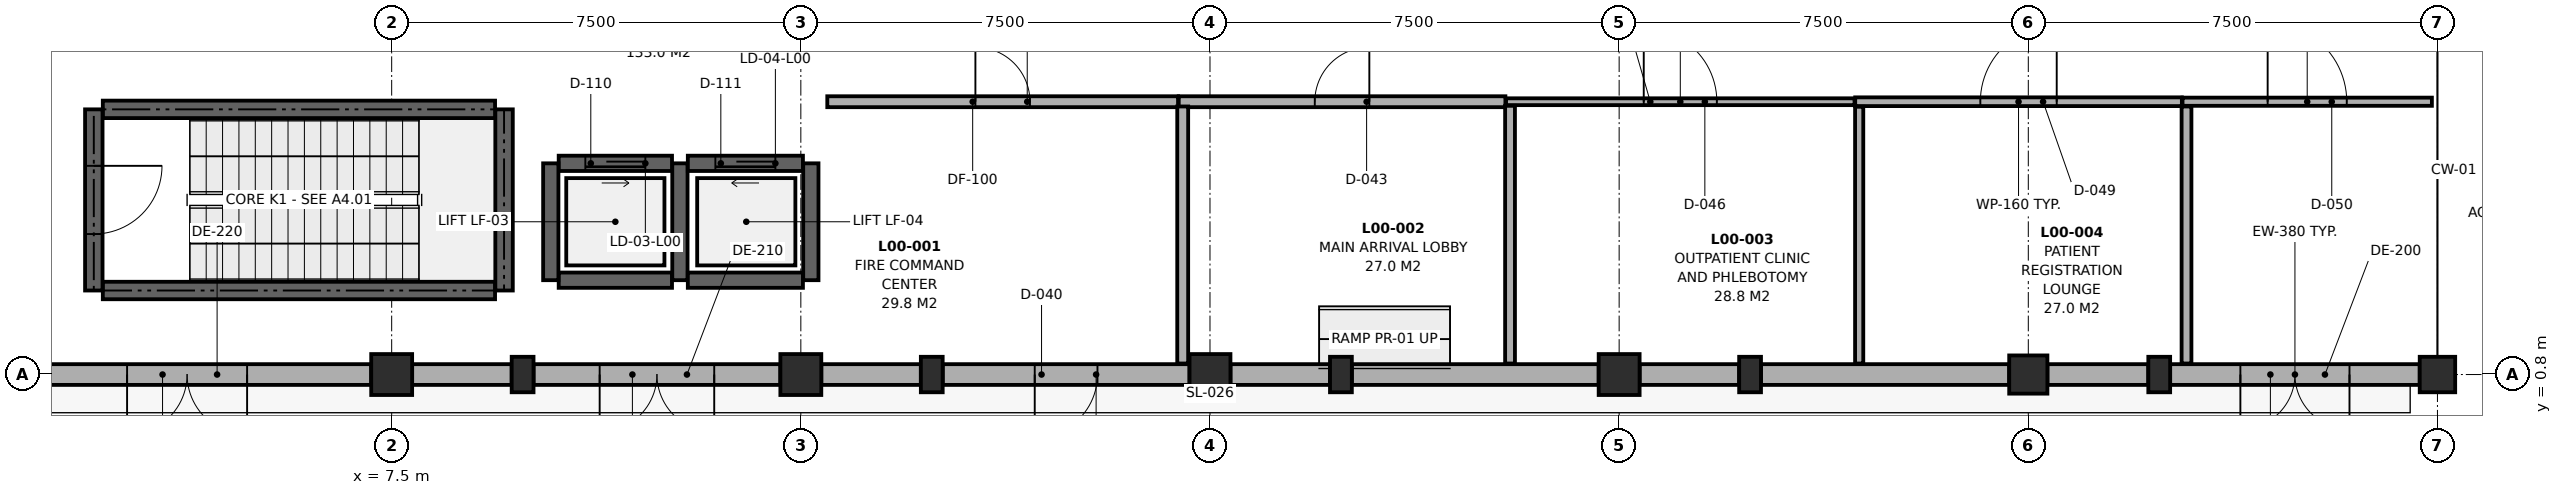
"""IFC4 building model, lengths in metres.
Left out: names, types, materials, properties, quantities, classifications, styles, units other than length and angle.
Written with IfcOpenShell. Run it as: python <this file> out.ifc"""

import sys

from ifc_helpers import new_model, si_unit, direction, frame, frame_2d, origin, origin_2d, place, context, subcontext, project, spatial, rectangle, extrude, element, fill, save


model = new_model("IFC4")
c1 = context("Model", 3, precision=1e-05, world=origin(), true_north=direction((0.0, 1.0)))
c2 = subcontext(c1, "Body", "Model", "MODEL_VIEW")
j1 = project(units=[si_unit("LENGTHUNIT", "METRE"), si_unit("PLANEANGLEUNIT", "RADIAN")], contexts=[c1])
p1 = place(None, origin())
s1 = spatial("IfcSite", under=j1, at=p1, CompositionType="ELEMENT")
p2 = place(p1, origin())
s2 = spatial("IfcBuilding", under=s1, at=p2, CompositionType="ELEMENT")
p3 = place(p2, origin())
s3 = spatial("IfcBuildingStorey", under=s2, at=p3, CompositionType="ELEMENT", Elevation=0.0)
for number, where, z_axis, x_axis in (
    (1, (7.5, 0.8, 0.0), (0.0, 0.0, 1.0), (1.0, 0.0, 0.0)),
    (2, (15.0, 0.8, 0.0), (0.0, 0.0, 1.0), (1.0, 0.0, 0.0)),
    (3, (22.5, 0.8, 0.0), (0.0, 0.0, 1.0), (1.0, 0.0, 0.0)),
    (4, (30.0, 0.8, 0.0), (0.0, 0.0, 1.0), (1.0, 0.0, 0.0)),
):
    element("IfcColumn", number, at=place(p3, frame(where, z_axis=z_axis, x_axis=x_axis)), inside=s3, PredefinedType="COLUMN", context=c2, shape_type="SweptSolid", body=[
        extrude(rectangle(XDim=0.75, YDim=0.75, at=origin_2d()), origin(), (0.0, 0.0, 1.0), 4.7),
    ])
p4 = place(p3, frame((37.5, 0.8, 0.0), z_axis=(0.0, 0.0, 1.0), x_axis=(1.0, 0.0, 0.0)))
e5 = element("IfcColumn", 5, at=p4, inside=s3, PredefinedType="COLUMN", context=c2, shape_type="SweptSolid", body=[
    extrude(rectangle(XDim=0.7, YDim=0.7, at=origin_2d()), origin(), (0.0, 0.0, 1.0), 4.7),
])
p5 = place(p3, frame((45.0, 0.8, 0.0), z_axis=(0.0, 0.0, 1.0), x_axis=(1.0, 0.0, 0.0)))
e6 = element("IfcColumn", 6, at=p5, inside=s3, PredefinedType="COLUMN", context=c2, shape_type="SweptSolid", body=[
    extrude(rectangle(XDim=0.65, YDim=0.65, at=origin_2d()), origin(), (0.0, 0.0, 1.0), 4.7),
])
for number, where, z_axis, x_axis in (
    (7, (9.9, 0.8, 0.0), (0.0, 0.0, 1.0), (1.0, 0.0, 0.0)),
    (8, (17.4, 0.8, 0.0), (0.0, 0.0, 1.0), (1.0, 0.0, 0.0)),
    (9, (24.9, 0.8, 0.0), (0.0, 0.0, 1.0), (1.0, 0.0, 0.0)),
    (10, (32.4, 0.8, 0.0), (0.0, 0.0, 1.0), (1.0, 0.0, 0.0)),
    (11, (39.9, 0.8, 0.0), (0.0, 0.0, 1.0), (1.0, 0.0, 0.0)),
):
    element("IfcColumn", number, at=place(p3, frame(where, z_axis=z_axis, x_axis=x_axis)), inside=s3, PredefinedType="PILASTER", context=c2, shape_type="SweptSolid", body=[
        extrude(rectangle(XDim=0.4, YDim=0.65, at=origin_2d()), origin(), (0.0, 0.0, 1.0), 4.7),
    ])
p6 = place(p3, frame((44.675, 0.8, 0.0), z_axis=(0.0, 0.0, 1.0), x_axis=(-1.0, 0.0, 0.0)))
e12 = element("IfcWall", 12, at=p6, inside=s3, PredefinedType="SOLIDWALL", context=c2, shape_type="SweptSolid", body=[
    extrude(rectangle(XDim=4.575, YDim=0.38, at=frame_2d((2.288, 0.0))), origin(), (0.0, 0.0, 1.0), 4.035),
])
p7 = place(p6, frame((1.288, 0.0, 0.0)))
e13 = element("IfcOpeningElement", 13, at=p7, cuts=e12, PredefinedType="OPENING", context=c2, shape_type="SweptSolid", body=[
    extrude(rectangle(XDim=2.0, YDim=2.35, at=frame_2d((1.0, 1.175))), frame((0.0, 0.202, 0.0), z_axis=(0.0, -1.0, 0.0), x_axis=(1.0, 0.0, 0.0)), (0.0, 0.0, 1.0), 0.404),
])
p8 = place(p3, frame((39.7, 0.8, 0.0), z_axis=(0.0, 0.0, 1.0), x_axis=(-1.0, 0.0, 0.0)))
e14 = element("IfcWall", 14, at=p8, inside=s3, PredefinedType="SOLIDWALL", context=c2, shape_type="SweptSolid", body=[
    extrude(rectangle(XDim=1.85, YDim=0.38, at=frame_2d((0.925, 0.0))), origin(), (0.0, 0.0, 1.0), 4.035),
])
p9 = place(p3, frame((37.15, 0.8, 0.0), z_axis=(0.0, 0.0, 1.0), x_axis=(-1.0, 0.0, 0.0)))
e15 = element("IfcWall", 15, at=p9, inside=s3, PredefinedType="SOLIDWALL", context=c2, shape_type="SweptSolid", body=[
    extrude(rectangle(XDim=4.55, YDim=0.38, at=frame_2d((2.275, 0.0))), origin(), (0.0, 0.0, 1.0), 4.035),
])
p10 = place(p3, frame((32.2, 0.8, 0.0), z_axis=(0.0, 0.0, 1.0), x_axis=(-1.0, 0.0, 0.0)))
e16 = element("IfcWall", 16, at=p10, inside=s3, PredefinedType="SOLIDWALL", context=c2, shape_type="SweptSolid", body=[
    extrude(rectangle(XDim=1.825, YDim=0.38, at=frame_2d((0.913, 0.0))), origin(), (0.0, 0.0, 1.0), 4.035),
])
p11 = place(p3, frame((29.625, 0.8, 0.0), z_axis=(0.0, 0.0, 1.0), x_axis=(-1.0, 0.0, 0.0)))
e17 = element("IfcWall", 17, at=p11, inside=s3, PredefinedType="SOLIDWALL", context=c2, shape_type="SweptSolid", body=[
    extrude(rectangle(XDim=4.525, YDim=0.38, at=frame_2d((2.262, 0.0))), origin(), (0.0, 0.0, 1.0), 4.035),
])
p12 = place(p3, frame((24.7, 0.8, 0.0), z_axis=(0.0, 0.0, 1.0), x_axis=(-1.0, 0.0, 0.0)))
e18 = element("IfcWall", 18, at=p12, inside=s3, PredefinedType="SOLIDWALL", context=c2, shape_type="SweptSolid", body=[
    extrude(rectangle(XDim=1.825, YDim=0.38, at=frame_2d((0.913, 0.0))), origin(), (0.0, 0.0, 1.0), 4.035),
])
p13 = place(p3, frame((22.125, 0.8, 0.0), z_axis=(0.0, 0.0, 1.0), x_axis=(-1.0, 0.0, 0.0)))
e19 = element("IfcWall", 19, at=p13, inside=s3, PredefinedType="SOLIDWALL", context=c2, shape_type="SweptSolid", body=[
    extrude(rectangle(XDim=4.525, YDim=0.38, at=frame_2d((2.262, 0.0))), origin(), (0.0, 0.0, 1.0), 4.035),
])
p14 = place(p13, frame((1.688, 0.0, 0.0)))
e20 = element("IfcOpeningElement", 20, at=p14, cuts=e19, PredefinedType="OPENING", context=c2, shape_type="SweptSolid", body=[
    extrude(rectangle(XDim=1.15, YDim=2.2, at=frame_2d((0.575, 1.1))), frame((0.0, 0.202, 0.0), z_axis=(0.0, -1.0, 0.0), x_axis=(1.0, 0.0, 0.0)), (0.0, 0.0, 1.0), 0.404),
])
p15 = place(p3, frame((17.2, 0.8, 0.0), z_axis=(0.0, 0.0, 1.0), x_axis=(-1.0, 0.0, 0.0)))
e21 = element("IfcWall", 21, at=p15, inside=s3, PredefinedType="SOLIDWALL", context=c2, shape_type="SweptSolid", body=[
    extrude(rectangle(XDim=1.825, YDim=0.38, at=frame_2d((0.913, 0.0))), origin(), (0.0, 0.0, 1.0), 4.035),
])
p16 = place(p3, frame((14.625, 0.8, 0.0), z_axis=(0.0, 0.0, 1.0), x_axis=(-1.0, 0.0, 0.0)))
e22 = element("IfcWall", 22, at=p16, inside=s3, PredefinedType="SOLIDWALL", context=c2, shape_type="SweptSolid", body=[
    extrude(rectangle(XDim=4.525, YDim=0.38, at=frame_2d((2.262, 0.0))), origin(), (0.0, 0.0, 1.0), 4.035),
])
p17 = place(p16, frame((1.212, 0.0, 0.0)))
e23 = element("IfcOpeningElement", 23, at=p17, cuts=e22, PredefinedType="OPENING", context=c2, shape_type="SweptSolid", body=[
    extrude(rectangle(XDim=2.1, YDim=2.4, at=frame_2d((1.05, 1.2))), frame((0.0, 0.202, 0.0), z_axis=(0.0, -1.0, 0.0), x_axis=(1.0, 0.0, 0.0)), (0.0, 0.0, 1.0), 0.404),
])
p18 = place(p3, frame((9.7, 0.8, 0.0), z_axis=(0.0, 0.0, 1.0), x_axis=(-1.0, 0.0, 0.0)))
e24 = element("IfcWall", 24, at=p18, inside=s3, PredefinedType="SOLIDWALL", context=c2, shape_type="SweptSolid", body=[
    extrude(rectangle(XDim=1.825, YDim=0.38, at=frame_2d((0.913, 0.0))), origin(), (0.0, 0.0, 1.0), 4.035),
])
p19 = place(p3, frame((7.125, 0.8, 0.0), z_axis=(0.0, 0.0, 1.0), x_axis=(-1.0, 0.0, 0.0)))
e25 = element("IfcWall", 25, at=p19, inside=s3, PredefinedType="SOLIDWALL", context=c2, shape_type="SweptSolid", body=[
    extrude(rectangle(XDim=6.75, YDim=0.38, at=frame_2d((3.375, 0.0))), origin(), (0.0, 0.0, 1.0), 4.035),
])
p20 = place(p19, frame((2.275, 0.0, 0.0)))
e26 = element("IfcOpeningElement", 26, at=p20, cuts=e25, PredefinedType="OPENING", context=c2, shape_type="SweptSolid", body=[
    extrude(rectangle(XDim=2.2, YDim=2.45, at=frame_2d((1.1, 1.225))), frame((0.0, 0.202, 0.0), z_axis=(0.0, -1.0, 0.0), x_axis=(1.0, 0.0, 0.0)), (0.0, 0.0, 1.0), 0.404),
])
p21 = place(p3, frame((2.205, 2.34, 0.0), z_axis=(0.0, 0.0, 1.0), x_axis=(1.0, 0.0, 0.0)))
e27 = element("IfcWall", 27, at=p21, inside=s3, PredefinedType="SHEAR", context=c2, shape_type="SweptSolid", body=[
    extrude(rectangle(XDim=7.19, YDim=0.32, at=frame_2d((3.595, 0.0))), origin(), (0.0, 0.0, 1.0), 4.7),
])
p22 = place(p3, frame((9.56, 2.34, 0.0), z_axis=(0.0, 0.0, 1.0), x_axis=(0.0, 1.0, 0.0)))
e28 = element("IfcWall", 28, at=p22, inside=s3, PredefinedType="SHEAR", context=c2, shape_type="SweptSolid", body=[
    extrude(rectangle(XDim=3.32, YDim=0.32, at=frame_2d((1.66, 0.0))), origin(), (0.0, 0.0, 1.0), 4.7),
])
p23 = place(p3, frame((9.395, 5.66, 0.0), z_axis=(0.0, 0.0, 1.0), x_axis=(-1.0, 0.0, 0.0)))
e29 = element("IfcWall", 29, at=p23, inside=s3, PredefinedType="SHEAR", context=c2, shape_type="SweptSolid", body=[
    extrude(rectangle(XDim=7.19, YDim=0.32, at=frame_2d((3.595, 0.0))), origin(), (0.0, 0.0, 1.0), 4.7),
])
p24 = place(p3, frame((2.04, 5.66, 0.0), z_axis=(0.0, 0.0, 1.0), x_axis=(0.0, -1.0, 0.0)))
e30 = element("IfcWall", 30, at=p24, inside=s3, PredefinedType="SHEAR", context=c2, shape_type="SweptSolid", body=[
    extrude(rectangle(XDim=3.32, YDim=0.32, at=frame_2d((1.66, 0.0))), origin(), (0.0, 0.0, 1.0), 4.7),
])
p25 = place(p24, frame((1.035, 0.0, 0.0)))
e31 = element("IfcOpeningElement", 31, at=p25, cuts=e30, PredefinedType="OPENING", context=c2, shape_type="SweptSolid", body=[
    extrude(rectangle(XDim=1.25, YDim=2.2, at=frame_2d((0.625, 1.1))), frame((0.0, 0.172, 0.0), z_axis=(0.0, -1.0, 0.0), x_axis=(1.0, 0.0, 0.0)), (0.0, 0.0, 1.0), 0.344),
])
p26 = place(p3, frame((10.562, 2.529, 0.0), z_axis=(0.0, 0.0, 1.0), x_axis=(1.0, 0.0, 0.0)))
e32 = element("IfcWall", 32, at=p26, inside=s3, PredefinedType="SHEAR", context=c2, shape_type="SweptSolid", body=[
    extrude(rectangle(XDim=2.077, YDim=0.28, at=frame_2d((1.039, 0.0))), origin(), (0.0, 0.0, 1.0), 4.7),
])
p27 = place(p3, frame((12.783, 2.529, 0.0), z_axis=(0.0, 0.0, 1.0), x_axis=(0.0, 1.0, 0.0)))
e33 = element("IfcWall", 33, at=p27, inside=s3, PredefinedType="SHEAR", context=c2, shape_type="SweptSolid", body=[
    extrude(rectangle(XDim=2.141, YDim=0.28, at=frame_2d((1.071, 0.0))), origin(), (0.0, 0.0, 1.0), 4.7),
])
p28 = place(p3, frame((12.638, 4.671, 0.0), z_axis=(0.0, 0.0, 1.0), x_axis=(-1.0, 0.0, 0.0)))
e34 = element("IfcWall", 34, at=p28, inside=s3, PredefinedType="SHEAR", context=c2, shape_type="SweptSolid", body=[
    extrude(rectangle(XDim=2.077, YDim=0.28, at=frame_2d((1.039, 0.0))), origin(), (0.0, 0.0, 1.0), 4.7),
])
p29 = place(p28, frame((0.489, 0.0, 0.0)))
e35 = element("IfcOpeningElement", 35, at=p29, cuts=e34, PredefinedType="OPENING", context=c2, shape_type="SweptSolid", body=[
    extrude(rectangle(XDim=1.1, YDim=2.15, at=frame_2d((0.55, 1.075))), frame((0.0, 0.152, 0.0), z_axis=(0.0, -1.0, 0.0), x_axis=(1.0, 0.0, 0.0)), (0.0, 0.0, 1.0), 0.304),
])
p30 = place(p3, frame((10.417, 4.671, 0.0), z_axis=(0.0, 0.0, 1.0), x_axis=(0.0, -1.0, 0.0)))
e36 = element("IfcWall", 36, at=p30, inside=s3, PredefinedType="SHEAR", context=c2, shape_type="SweptSolid", body=[
    extrude(rectangle(XDim=2.141, YDim=0.28, at=frame_2d((1.071, 0.0))), origin(), (0.0, 0.0, 1.0), 4.7),
])
p31 = place(p3, frame((12.928, 2.529, 0.0), z_axis=(0.0, 0.0, 1.0), x_axis=(1.0, 0.0, 0.0)))
e37 = element("IfcWall", 37, at=p31, inside=s3, PredefinedType="SHEAR", context=c2, shape_type="SweptSolid", body=[
    extrude(rectangle(XDim=2.11, YDim=0.28, at=frame_2d((1.055, 0.0))), origin(), (0.0, 0.0, 1.0), 4.7),
])
p32 = place(p3, frame((15.184, 2.529, 0.0), z_axis=(0.0, 0.0, 1.0), x_axis=(0.0, 1.0, 0.0)))
e38 = element("IfcWall", 38, at=p32, inside=s3, PredefinedType="SHEAR", context=c2, shape_type="SweptSolid", body=[
    extrude(rectangle(XDim=2.141, YDim=0.28, at=frame_2d((1.071, 0.0))), origin(), (0.0, 0.0, 1.0), 4.7),
])
p33 = place(p3, frame((15.039, 4.671, 0.0), z_axis=(0.0, 0.0, 1.0), x_axis=(-1.0, 0.0, 0.0)))
e39 = element("IfcWall", 39, at=p33, inside=s3, PredefinedType="SHEAR", context=c2, shape_type="SweptSolid", body=[
    extrude(rectangle(XDim=2.11, YDim=0.28, at=frame_2d((1.055, 0.0))), origin(), (0.0, 0.0, 1.0), 4.7),
])
p34 = place(p33, frame((0.505, 0.0, 0.0)))
e40 = element("IfcOpeningElement", 40, at=p34, cuts=e39, PredefinedType="OPENING", context=c2, shape_type="SweptSolid", body=[
    extrude(rectangle(XDim=1.1, YDim=2.15, at=frame_2d((0.55, 1.075))), frame((0.0, 0.152, 0.0), z_axis=(0.0, -1.0, 0.0), x_axis=(1.0, 0.0, 0.0)), (0.0, 0.0, 1.0), 0.304),
])
p35 = place(p3, frame((15.485, 5.8, 0.0), z_axis=(0.0, 0.0, 1.0), x_axis=(1.0, 0.0, 0.0)))
e41 = element("IfcWall", 41, at=p35, inside=s3, PredefinedType="PARTITIONING", context=c2, shape_type="SweptSolid", body=[
    extrude(rectangle(XDim=6.43, YDim=0.2, at=frame_2d((3.215, 0.0))), origin(), (0.0, 0.0, 1.0), 4.7),
])
p36 = place(p35, frame((2.715, 0.0, 0.0)))
e42 = element("IfcOpeningElement", 42, at=p36, cuts=e41, PredefinedType="OPENING", context=c2, shape_type="SweptSolid", body=[
    extrude(rectangle(XDim=1.0, YDim=2.15, at=frame_2d((0.5, 1.075))), frame((0.0, 0.112, 0.0), z_axis=(0.0, -1.0, 0.0), x_axis=(1.0, 0.0, 0.0)), (0.0, 0.0, 1.0), 0.224),
])
p37 = place(p3, frame((21.927, 5.8, 0.0), z_axis=(0.0, 0.0, 1.0), x_axis=(1.0, 0.0, 0.0)))
e43 = element("IfcWall", 43, at=p37, inside=s3, PredefinedType="PARTITIONING", context=c2, shape_type="SweptSolid", body=[
    extrude(rectangle(XDim=5.988, YDim=0.2, at=frame_2d((2.994, 0.0))), origin(), (0.0, 0.0, 1.0), 3.765),
])
p38 = place(p37, frame((2.494, 0.0, 0.0)))
e44 = element("IfcOpeningElement", 44, at=p38, cuts=e43, PredefinedType="OPENING", context=c2, shape_type="SweptSolid", body=[
    extrude(rectangle(XDim=1.0, YDim=2.15, at=frame_2d((0.5, 1.075))), frame((0.0, 0.112, 0.0), z_axis=(0.0, -1.0, 0.0), x_axis=(1.0, 0.0, 0.0)), (0.0, 0.0, 1.0), 0.224),
])
p39 = place(p3, frame((27.927, 5.8, 0.0), z_axis=(0.0, 0.0, 1.0), x_axis=(1.0, 0.0, 0.0)))
e45 = element("IfcWall", 45, at=p39, inside=s3, PredefinedType="PARTITIONING", context=c2, shape_type="SweptSolid", body=[
    extrude(rectangle(XDim=6.388, YDim=0.125, at=frame_2d((3.194, 0.0))), origin(), (0.0, 0.0, 1.0), 3.985),
])
p40 = place(p39, frame((2.524, 0.0, 0.0)))
e46 = element("IfcOpeningElement", 46, at=p40, cuts=e45, PredefinedType="OPENING", context=c2, shape_type="SweptSolid", body=[
    extrude(rectangle(XDim=1.34, YDim=2.24, at=frame_2d((0.67, 1.12))), frame((0.0, 0.074, 0.0), z_axis=(0.0, -1.0, 0.0), x_axis=(1.0, 0.0, 0.0)), (0.0, 0.0, 1.0), 0.149),
])
p41 = place(p3, frame((34.327, 5.8, 0.0), z_axis=(0.0, 0.0, 1.0), x_axis=(1.0, 0.0, 0.0)))
e47 = element("IfcWall", 47, at=p41, inside=s3, PredefinedType="PARTITIONING", context=c2, shape_type="SweptSolid", body=[
    extrude(rectangle(XDim=5.988, YDim=0.16, at=frame_2d((2.994, 0.0))), origin(), (0.0, 0.0, 1.0), 3.985),
])
p42 = place(p41, frame((2.294, 0.0, 0.0)))
e48 = element("IfcOpeningElement", 48, at=p42, cuts=e47, PredefinedType="OPENING", context=c2, shape_type="SweptSolid", body=[
    extrude(rectangle(XDim=1.4, YDim=2.25, at=frame_2d((0.7, 1.125))), frame((0.0, 0.092, 0.0), z_axis=(0.0, -1.0, 0.0), x_axis=(1.0, 0.0, 0.0)), (0.0, 0.0, 1.0), 0.184),
])
p43 = place(p3, frame((40.327, 5.8, 0.0), z_axis=(0.0, 0.0, 1.0), x_axis=(1.0, 0.0, 0.0)))
e49 = element("IfcWall", 49, at=p43, inside=s3, PredefinedType="PARTITIONING", context=c2, shape_type="SweptSolid", body=[
    extrude(rectangle(XDim=4.571, YDim=0.15, at=frame_2d((2.286, 0.0))), origin(), (0.0, 0.0, 1.0), 4.035),
])
p44 = place(p43, frame((1.561, 0.0, 0.0)))
e50 = element("IfcOpeningElement", 50, at=p44, cuts=e49, PredefinedType="OPENING", context=c2, shape_type="SweptSolid", body=[
    extrude(rectangle(XDim=1.45, YDim=2.26, at=frame_2d((0.725, 1.13))), frame((0.0, 0.087, 0.0), z_axis=(0.0, -1.0, 0.0), x_axis=(1.0, 0.0, 0.0)), (0.0, 0.0, 1.0), 0.174),
])
p45 = place(p3, frame((22.0, 1.002, 0.0), z_axis=(0.0, 0.0, 1.0), x_axis=(0.0, 1.0, 0.0)))
e51 = element("IfcWall", 51, at=p45, inside=s3, PredefinedType="PARTITIONING", context=c2, shape_type="SweptSolid", body=[
    extrude(rectangle(XDim=4.711, YDim=0.2, at=frame_2d((2.355, 0.0))), origin(), (0.0, 0.0, 1.0), 4.035),
])
p46 = place(p3, frame((28.0, 1.002, 0.0), z_axis=(0.0, 0.0, 1.0), x_axis=(0.0, 1.0, 0.0)))
e52 = element("IfcWall", 52, at=p46, inside=s3, PredefinedType="PARTITIONING", context=c2, shape_type="SweptSolid", body=[
    extrude(rectangle(XDim=4.724, YDim=0.18, at=frame_2d((2.362, 0.0))), origin(), (0.0, 0.0, 1.0), 4.035),
])
p47 = place(p3, frame((34.4, 1.002, 0.0), z_axis=(0.0, 0.0, 1.0), x_axis=(0.0, 1.0, 0.0)))
e53 = element("IfcWall", 53, at=p47, inside=s3, PredefinedType="PARTITIONING", context=c2, shape_type="SweptSolid", body=[
    extrude(rectangle(XDim=4.706, YDim=0.15, at=frame_2d((2.353, 0.0))), origin(), (0.0, 0.0, 1.0), 4.035),
])
p48 = place(p3, frame((40.4, 1.002, 0.0), z_axis=(0.0, 0.0, 1.0), x_axis=(0.0, 1.0, 0.0)))
e54 = element("IfcWall", 54, at=p48, inside=s3, PredefinedType="PARTITIONING", context=c2, shape_type="SweptSolid", body=[
    extrude(rectangle(XDim=4.711, YDim=0.18, at=frame_2d((2.355, 0.0))), origin(), (0.0, 0.0, 1.0), 4.035),
])
p49 = place(p7, origin())
e55 = element("IfcDoor", 55, at=p49, inside=s3, OperationType="DOUBLE_DOOR_SINGLE_SWING", PredefinedType="DOOR", context=c2, shape_type="SweptSolid", body=[
    extrude(rectangle(XDim=2.0, YDim=2.35, at=frame_2d((1.0, 1.175))), frame((0.0, 0.025, 0.0), z_axis=(0.0, -1.0, 0.0), x_axis=(1.0, 0.0, 0.0)), (0.0, 0.0, 1.0), 0.05),
])
fill(e13, e55)
p50 = place(p14, origin())
e56 = element("IfcDoor", 56, at=p50, inside=s3, OperationType="SINGLE_SWING_RIGHT", PredefinedType="DOOR", context=c2, shape_type="SweptSolid", body=[
    extrude(rectangle(XDim=1.15, YDim=2.2, at=frame_2d((0.575, 1.1))), frame((0.0, 0.025, 0.0), z_axis=(0.0, -1.0, 0.0), x_axis=(1.0, 0.0, 0.0)), (0.0, 0.0, 1.0), 0.05),
])
fill(e20, e56)
p51 = place(p17, origin())
e57 = element("IfcDoor", 57, at=p51, inside=s3, OperationType="DOUBLE_DOOR_SINGLE_SWING", PredefinedType="DOOR", context=c2, shape_type="SweptSolid", body=[
    extrude(rectangle(XDim=2.1, YDim=2.4, at=frame_2d((1.05, 1.2))), frame((0.0, 0.025, 0.0), z_axis=(0.0, -1.0, 0.0), x_axis=(1.0, 0.0, 0.0)), (0.0, 0.0, 1.0), 0.05),
])
fill(e23, e57)
p52 = place(p20, origin())
e58 = element("IfcDoor", 58, at=p52, inside=s3, OperationType="DOUBLE_DOOR_SINGLE_SWING", PredefinedType="DOOR", context=c2, shape_type="SweptSolid", body=[
    extrude(rectangle(XDim=2.2, YDim=2.45, at=frame_2d((1.1, 1.225))), frame((0.0, 0.025, 0.0), z_axis=(0.0, -1.0, 0.0), x_axis=(1.0, 0.0, 0.0)), (0.0, 0.0, 1.0), 0.05),
])
fill(e26, e58)
p53 = place(p25, origin())
e59 = element("IfcDoor", 59, at=p53, inside=s3, OperationType="SINGLE_SWING_LEFT", PredefinedType="DOOR", context=c2, shape_type="SweptSolid", body=[
    extrude(rectangle(XDim=1.25, YDim=2.2, at=frame_2d((0.625, 1.1))), frame((0.0, 0.025, 0.0), z_axis=(0.0, -1.0, 0.0), x_axis=(1.0, 0.0, 0.0)), (0.0, 0.0, 1.0), 0.05),
])
fill(e31, e59)
p54 = place(p29, origin())
e60 = element("IfcDoor", 60, at=p54, inside=s3, OperationType="SLIDING_TO_LEFT", PredefinedType="DOOR", context=c2, shape_type="SweptSolid", body=[
    extrude(rectangle(XDim=1.1, YDim=2.15, at=frame_2d((0.55, 1.075))), frame((0.0, 0.025, 0.0), z_axis=(0.0, -1.0, 0.0), x_axis=(1.0, 0.0, 0.0)), (0.0, 0.0, 1.0), 0.05),
])
fill(e35, e60)
p55 = place(p34, origin())
e61 = element("IfcDoor", 61, at=p55, inside=s3, OperationType="SLIDING_TO_RIGHT", PredefinedType="DOOR", context=c2, shape_type="SweptSolid", body=[
    extrude(rectangle(XDim=1.1, YDim=2.15, at=frame_2d((0.55, 1.075))), frame((0.0, 0.025, 0.0), z_axis=(0.0, -1.0, 0.0), x_axis=(1.0, 0.0, 0.0)), (0.0, 0.0, 1.0), 0.05),
])
fill(e40, e61)
p56 = place(p36, origin())
e62 = element("IfcDoor", 62, at=p56, inside=s3, OperationType="SINGLE_SWING_LEFT", PredefinedType="DOOR", context=c2, shape_type="SweptSolid", body=[
    extrude(rectangle(XDim=1.0, YDim=2.15, at=frame_2d((0.5, 1.075))), frame((0.0, 0.025, 0.0), z_axis=(0.0, -1.0, 0.0), x_axis=(1.0, 0.0, 0.0)), (0.0, 0.0, 1.0), 0.05),
])
fill(e42, e62)
p57 = place(p38, origin())
e63 = element("IfcDoor", 63, at=p57, inside=s3, OperationType="SINGLE_SWING_RIGHT", PredefinedType="DOOR", context=c2, shape_type="SweptSolid", body=[
    extrude(rectangle(XDim=1.0, YDim=2.15, at=frame_2d((0.5, 1.075))), frame((0.0, 0.025, 0.0), z_axis=(0.0, -1.0, 0.0), x_axis=(1.0, 0.0, 0.0)), (0.0, 0.0, 1.0), 0.05),
])
fill(e44, e63)
p58 = place(p40, origin())
e64 = element("IfcDoor", 64, at=p58, inside=s3, OperationType="SINGLE_SWING_LEFT", PredefinedType="DOOR", context=c2, shape_type="SweptSolid", body=[
    extrude(rectangle(XDim=1.34, YDim=2.24, at=frame_2d((0.67, 1.12))), frame((0.0, 0.025, 0.0), z_axis=(0.0, -1.0, 0.0), x_axis=(1.0, 0.0, 0.0)), (0.0, 0.0, 1.0), 0.05),
])
fill(e46, e64)
p59 = place(p42, origin())
e65 = element("IfcDoor", 65, at=p59, inside=s3, OperationType="SINGLE_SWING_RIGHT", PredefinedType="DOOR", context=c2, shape_type="SweptSolid", body=[
    extrude(rectangle(XDim=1.4, YDim=2.25, at=frame_2d((0.7, 1.125))), frame((0.0, 0.025, 0.0), z_axis=(0.0, -1.0, 0.0), x_axis=(1.0, 0.0, 0.0)), (0.0, 0.0, 1.0), 0.05),
])
fill(e48, e65)
p60 = place(p44, origin())
e66 = element("IfcDoor", 66, at=p60, inside=s3, OperationType="SINGLE_SWING_LEFT", PredefinedType="DOOR", context=c2, shape_type="SweptSolid", body=[
    extrude(rectangle(XDim=1.45, YDim=2.26, at=frame_2d((0.725, 1.13))), frame((0.0, 0.025, 0.0), z_axis=(0.0, -1.0, 0.0), x_axis=(1.0, 0.0, 0.0)), (0.0, 0.0, 1.0), 0.05),
])
fill(e50, e66)
save(model, sys.argv[1])
